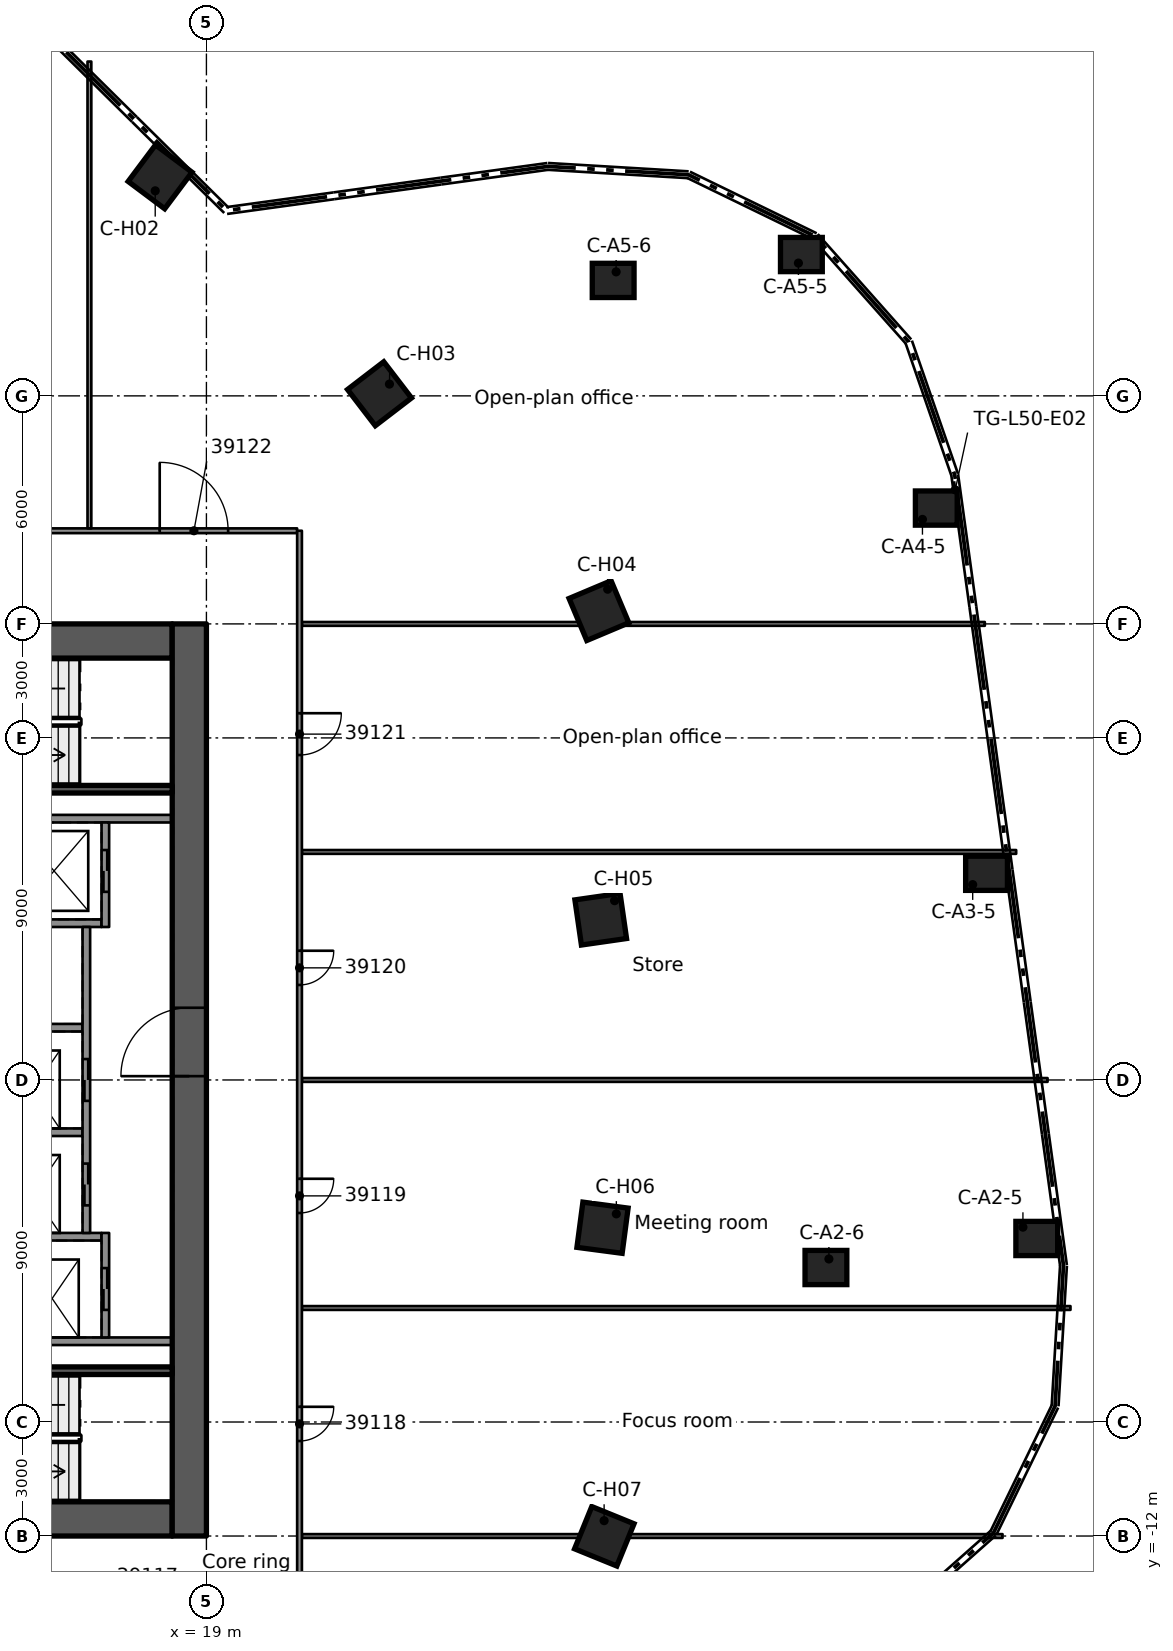
"""IFC4 building model, lengths in metres.
Left out: names, types, materials, properties, quantities, classifications, styles, units other than length and angle.
Written with IfcOpenShell. Run it as: python <this file> out.ifc"""

import sys

from ifc_helpers import new_model, si_unit, direction, frame, frame_2d, origin, origin_2d, place, context, subcontext, project, spatial, rectangle, extrude, element, fill, save


model = new_model("IFC4")
c1 = context("Model", 3, precision=1e-05, world=origin(), true_north=direction((0.0, 1.0)))
c2 = subcontext(c1, "Body", "Model", "MODEL_VIEW")
j1 = project(units=[si_unit("LENGTHUNIT", "METRE"), si_unit("PLANEANGLEUNIT", "RADIAN")], contexts=[c1])
p1 = place(None, origin())
s1 = spatial("IfcSite", under=j1, at=p1, CompositionType="ELEMENT")
p2 = place(p1, origin())
s2 = spatial("IfcBuilding", under=s1, at=p2, CompositionType="ELEMENT")
p3 = place(p2, frame((0.0, 0.0, 192.1)))
s3 = spatial("IfcBuildingStorey", under=s2, at=p3, CompositionType="ELEMENT", Elevation=192.1)
p4 = place(p3, frame((8.9, 11.55, 0.0), z_axis=(0.0, 0.0, 1.0), x_axis=(1.0, 0.0, 0.0)))
e1 = element("IfcWall", 1, at=p4, inside=s3, PredefinedType="SHEAR", context=c2, shape_type="SweptSolid", body=[
    extrude(rectangle(XDim=9.2, YDim=0.9, at=frame_2d((4.6, 0.0))), origin(), (0.0, 0.0, 1.0), 3.5),
])
p5 = place(p4, frame((3.0, 0.0, 0.0)))
e2 = element("IfcOpeningElement", 2, at=p5, cuts=e1, PredefinedType="OPENING", context=c2, shape_type="SweptSolid", body=[
    extrude(rectangle(XDim=1.1, YDim=2.1, at=frame_2d((0.55, 1.05))), frame((0.0, 0.46, 0.0), z_axis=(0.0, -1.0, 0.0), x_axis=(1.0, 0.0, 0.0)), (0.0, 0.0, 1.0), 0.92),
])
p6 = place(p4, frame((0.77, 0.0, 0.0)))
e3 = element("IfcOpeningElement", 3, at=p6, cuts=e1, PredefinedType="OPENING", context=c2, shape_type="SweptSolid", body=[
    extrude(rectangle(XDim=0.9, YDim=2.1, at=frame_2d((0.45, 1.05))), frame((0.0, 0.46, 0.0), z_axis=(0.0, -1.0, 0.0), x_axis=(1.0, 0.0, 0.0)), (0.0, 0.0, 1.0), 0.92),
])
p7 = place(p3, frame((8.9, -11.55, 0.0), z_axis=(0.0, 0.0, 1.0), x_axis=(1.0, 0.0, 0.0)))
e4 = element("IfcWall", 4, at=p7, inside=s3, PredefinedType="SHEAR", context=c2, shape_type="SweptSolid", body=[
    extrude(rectangle(XDim=9.2, YDim=0.9, at=frame_2d((4.6, 0.0))), origin(), (0.0, 0.0, 1.0), 3.5),
])
p8 = place(p7, frame((3.0, 0.0, 0.0)))
e5 = element("IfcOpeningElement", 5, at=p8, cuts=e4, PredefinedType="OPENING", context=c2, shape_type="SweptSolid", body=[
    extrude(rectangle(XDim=1.1, YDim=2.1, at=frame_2d((0.55, 1.05))), frame((0.0, 0.46, 0.0), z_axis=(0.0, -1.0, 0.0), x_axis=(1.0, 0.0, 0.0)), (0.0, 0.0, 1.0), 0.92),
])
p9 = place(p3, frame((18.55, -12.0, 0.0), z_axis=(0.0, 0.0, 1.0), x_axis=(0.0, 1.0, 0.0)))
e6 = element("IfcWall", 6, at=p9, inside=s3, PredefinedType="SHEAR", context=c2, shape_type="SweptSolid", body=[
    extrude(rectangle(XDim=24.0, YDim=0.9, at=frame_2d((12.0, 0.0))), origin(), (0.0, 0.0, 1.0), 3.5),
])
p10 = place(p9, frame((12.1, 0.0, 0.0)))
e7 = element("IfcOpeningElement", 7, at=p10, cuts=e6, PredefinedType="OPENING", context=c2, shape_type="SweptSolid", body=[
    extrude(rectangle(XDim=1.8, YDim=2.1, at=frame_2d((0.9, 1.05))), frame((0.0, 0.46, 0.0), z_axis=(0.0, -1.0, 0.0), x_axis=(1.0, 0.0, 0.0)), (0.0, 0.0, 1.0), 0.92),
])
for number, where, z_axis, x_axis in (
    (8, (40.85, -4.171, 0.0), (0.0, 0.0, 1.0), (1.0, 0.0, 0.0)),
    (9, (35.302, -4.935, 0.0), (0.0, 0.0, 1.0), (1.0, 0.0, 0.0)),
    (10, (39.528, 5.438, 0.0), (0.0, 0.0, 1.0), (1.0, 0.0, 0.0)),
    (11, (38.206, 15.048, 0.0), (0.0, 0.0, 1.0), (1.0, 0.0, 0.0)),
    (12, (34.656, 21.719, 0.0), (0.0, 0.0, 1.0), (1.0, 0.0, 0.0)),
    (13, (29.703, 21.038, 0.0), (0.0, 0.0, 1.0), (1.0, 0.0, 0.0)),
):
    element("IfcColumn", number, at=place(p3, frame(where, z_axis=z_axis, x_axis=x_axis)), inside=s3, PredefinedType="COLUMN", context=c2, shape_type="SweptSolid", body=[
        extrude(rectangle(XDim=1.1, YDim=0.9, at=origin_2d()), origin(), (0.0, 0.0, 1.0), 3.5),
    ])
for number, where, z_axis, x_axis in (
    (14, (17.781, 23.763, 0.0), (0.0, 0.0, 1.0), (0.599, 0.801, 0.0)),
    (15, (23.555, 18.056, 0.0), (0.0, 0.0, 1.0), (0.794, 0.608, 0.0)),
    (16, (29.329, 12.349, 0.0), (0.0, 0.0, 1.0), (0.922, 0.388, 0.0)),
    (17, (29.376, 4.23, 0.0), (0.0, 0.0, 1.0), (0.99, 0.143, 0.0)),
    (18, (29.423, -3.888, 0.0), (0.0, 0.0, 1.0), (0.991, -0.131, 0.0)),
    (19, (29.47, -12.007, 0.0), (0.0, 0.0, 1.0), (0.926, -0.377, 0.0)),
):
    element("IfcColumn", number, at=place(p3, frame(where, z_axis=z_axis, x_axis=x_axis)), inside=s3, PredefinedType="COLUMN", context=c2, shape_type="SweptSolid", body=[
        extrude(rectangle(XDim=1.2, YDim=1.2, at=origin_2d()), origin(), (0.0, 0.0, 1.0), 3.5),
    ])
for number, where, z_axis, x_axis in (
    (20, (11.54, -6.875, 0.0), (0.0, 0.0, 1.0), (1.0, 0.0, 0.0)),
    (21, (11.54, 6.875, 0.0), (0.0, 0.0, 1.0), (1.0, 0.0, 0.0)),
):
    element("IfcWall", number, at=place(p3, frame(where, z_axis=z_axis, x_axis=x_axis)), inside=s3, PredefinedType="SOLIDWALL", context=c2, shape_type="SweptSolid", body=[
        extrude(rectangle(XDim=6.56, YDim=0.2, at=frame_2d((3.28, 0.0))), origin(), (0.0, 0.0, 1.0), 3.08),
    ])
p11 = place(p3, frame((11.54, 4.125, 0.0), z_axis=(0.0, 0.0, 1.0), x_axis=(1.0, 0.0, 0.0)))
e22 = element("IfcWall", 22, at=p11, inside=s3, PredefinedType="SOLIDWALL", context=c2, shape_type="SweptSolid", body=[
    extrude(rectangle(XDim=4.7, YDim=0.2, at=frame_2d((2.35, 0.0))), origin(), (0.0, 0.0, 1.0), 3.08),
])
p12 = place(p3, frame((13.74, 1.375, 0.0), z_axis=(0.0, 0.0, 1.0), x_axis=(1.0, 0.0, 0.0)))
e23 = element("IfcWall", 23, at=p12, inside=s3, PredefinedType="SOLIDWALL", context=c2, shape_type="SweptSolid", body=[
    extrude(rectangle(XDim=2.0, YDim=0.2, at=frame_2d((1.0, 0.0))), origin(), (0.0, 0.0, 1.0), 3.08),
])
p13 = place(p3, frame((11.54, -1.375, 0.0), z_axis=(0.0, 0.0, 1.0), x_axis=(1.0, 0.0, 0.0)))
e24 = element("IfcWall", 24, at=p13, inside=s3, PredefinedType="SOLIDWALL", context=c2, shape_type="SweptSolid", body=[
    extrude(rectangle(XDim=4.2, YDim=0.2, at=frame_2d((2.1, 0.0))), origin(), (0.0, 0.0, 1.0), 3.08),
])
p14 = place(p3, frame((11.54, -4.125, 0.0), z_axis=(0.0, 0.0, 1.0), x_axis=(1.0, 0.0, 0.0)))
e25 = element("IfcWall", 25, at=p14, inside=s3, PredefinedType="SOLIDWALL", context=c2, shape_type="SweptSolid", body=[
    extrude(rectangle(XDim=4.7, YDim=0.2, at=frame_2d((2.35, 0.0))), origin(), (0.0, 0.0, 1.0), 3.08),
])
p15 = place(p3, frame((16.34, 6.775, 0.0), z_axis=(0.0, 0.0, 1.0), x_axis=(0.0, -1.0, 0.0)))
e26 = element("IfcWall", 26, at=p15, inside=s3, PredefinedType="SOLIDWALL", context=c2, shape_type="SweptSolid", body=[
    extrude(rectangle(XDim=2.75, YDim=0.2, at=frame_2d((1.375, 0.0))), origin(), (0.0, 0.0, 1.0), 3.08),
])
p16 = place(p15, frame((0.725, 0.0, 0.0)))
e27 = element("IfcOpeningElement", 27, at=p16, cuts=e26, PredefinedType="OPENING", context=c2, shape_type="SweptSolid", body=[
    extrude(rectangle(XDim=1.1, YDim=2.1, at=frame_2d((0.55, 1.05))), frame((0.0, 0.11, 0.0), z_axis=(0.0, -1.0, 0.0), x_axis=(1.0, 0.0, 0.0)), (0.0, 0.0, 1.0), 0.22),
])
p17 = place(p3, frame((15.84, 4.025, 0.0), z_axis=(0.0, 0.0, 1.0), x_axis=(0.0, -1.0, 0.0)))
e28 = element("IfcWall", 28, at=p17, inside=s3, PredefinedType="SOLIDWALL", context=c2, shape_type="SweptSolid", body=[
    extrude(rectangle(XDim=8.05, YDim=0.2, at=frame_2d((4.025, 0.0))), origin(), (0.0, 0.0, 1.0), 3.08),
])
p18 = place(p17, frame((3.475, 0.0, 0.0)))
e29 = element("IfcOpeningElement", 29, at=p18, cuts=e28, PredefinedType="OPENING", context=c2, shape_type="SweptSolid", body=[
    extrude(rectangle(XDim=1.1, YDim=2.1, at=frame_2d((0.55, 1.05))), frame((0.0, 0.11, 0.0), z_axis=(0.0, -1.0, 0.0), x_axis=(1.0, 0.0, 0.0)), (0.0, 0.0, 1.0), 0.22),
])
p19 = place(p17, frame((6.225, 0.0, 0.0)))
e30 = element("IfcOpeningElement", 30, at=p19, cuts=e28, PredefinedType="OPENING", context=c2, shape_type="SweptSolid", body=[
    extrude(rectangle(XDim=1.1, YDim=2.1, at=frame_2d((0.55, 1.05))), frame((0.0, 0.11, 0.0), z_axis=(0.0, -1.0, 0.0), x_axis=(1.0, 0.0, 0.0)), (0.0, 0.0, 1.0), 0.22),
])
p20 = place(p3, frame((16.34, -4.025, 0.0), z_axis=(0.0, 0.0, 1.0), x_axis=(0.0, -1.0, 0.0)))
e31 = element("IfcWall", 31, at=p20, inside=s3, PredefinedType="SOLIDWALL", context=c2, shape_type="SweptSolid", body=[
    extrude(rectangle(XDim=2.75, YDim=0.2, at=frame_2d((1.375, 0.0))), origin(), (0.0, 0.0, 1.0), 3.08),
])
p21 = place(p20, frame((0.925, 0.0, 0.0)))
e32 = element("IfcOpeningElement", 32, at=p21, cuts=e31, PredefinedType="OPENING", context=c2, shape_type="SweptSolid", body=[
    extrude(rectangle(XDim=1.1, YDim=2.1, at=frame_2d((0.55, 1.05))), frame((0.0, 0.11, 0.0), z_axis=(0.0, -1.0, 0.0), x_axis=(1.0, 0.0, 0.0)), (0.0, 0.0, 1.0), 0.22),
])
for number, where, z_axis, x_axis in (
    (33, (11.54, -7.65, 0.0), (0.0, 0.0, 1.0), (1.0, 0.0, 0.0)),
    (34, (11.54, 7.65, 0.0), (0.0, 0.0, 1.0), (1.0, 0.0, 0.0)),
):
    element("IfcWall", number, at=place(p3, frame(where, z_axis=z_axis, x_axis=x_axis)), inside=s3, PredefinedType="SOLIDWALL", context=c2, shape_type="SweptSolid", body=[
        extrude(rectangle(XDim=6.56, YDim=0.2, at=frame_2d((3.28, 0.0))), origin(), (0.0, 0.0, 1.0), 3.08),
    ])
p22 = place(p3, frame((21.512, -12.0, 0.0), z_axis=(0.0, 0.0, 1.0), x_axis=(1.0, 0.0, 0.0)))
e35 = element("IfcWall", 35, at=p22, inside=s3, PredefinedType="PARTITIONING", context=c2, shape_type="SweptSolid", body=[
    extrude(rectangle(XDim=18.437, YDim=0.1, at=frame_2d((9.219, 0.0))), origin(), (0.0, 0.0, 1.0), 3.06),
])
p23 = place(p3, frame((21.512, -6.0, 0.0), z_axis=(0.0, 0.0, 1.0), x_axis=(1.0, 0.0, 0.0)))
e36 = element("IfcWall", 36, at=p23, inside=s3, PredefinedType="PARTITIONING", context=c2, shape_type="SweptSolid", body=[
    extrude(rectangle(XDim=20.225, YDim=0.1, at=frame_2d((10.113, 0.0))), origin(), (0.0, 0.0, 1.0), 3.06),
])
p24 = place(p3, frame((21.512, 0.0, 0.0), z_axis=(0.0, 0.0, 1.0), x_axis=(1.0, 0.0, 0.0)))
e37 = element("IfcWall", 37, at=p24, inside=s3, PredefinedType="PARTITIONING", context=c2, shape_type="SweptSolid", body=[
    extrude(rectangle(XDim=19.622, YDim=0.1, at=frame_2d((9.811, 0.0))), origin(), (0.0, 0.0, 1.0), 3.06),
])
p25 = place(p3, frame((21.512, 6.0, 0.0), z_axis=(0.0, 0.0, 1.0), x_axis=(1.0, 0.0, 0.0)))
e38 = element("IfcWall", 38, at=p25, inside=s3, PredefinedType="PARTITIONING", context=c2, shape_type="SweptSolid", body=[
    extrude(rectangle(XDim=18.796, YDim=0.1, at=frame_2d((9.398, 0.0))), origin(), (0.0, 0.0, 1.0), 3.06),
])
p26 = place(p3, frame((21.512, 12.0, 0.0), z_axis=(0.0, 0.0, 1.0), x_axis=(1.0, 0.0, 0.0)))
e39 = element("IfcWall", 39, at=p26, inside=s3, PredefinedType="PARTITIONING", context=c2, shape_type="SweptSolid", body=[
    extrude(rectangle(XDim=17.971, YDim=0.1, at=frame_2d((8.985, 0.0))), origin(), (0.0, 0.0, 1.0), 3.06),
])
p27 = place(p3, frame((10.391, 14.451, 0.0), z_axis=(0.0, 0.0, 1.0), x_axis=(1.0, 0.0, 0.0)))
e40 = element("IfcWall", 40, at=p27, inside=s3, PredefinedType="PARTITIONING", context=c2, shape_type="SweptSolid", body=[
    extrude(rectangle(XDim=10.996, YDim=0.125, at=frame_2d((5.498, 0.0))), origin(), (0.0, 0.0, 1.0), 3.06),
])
p28 = place(p27, frame((7.38, 0.0, 0.0)))
e41 = element("IfcOpeningElement", 41, at=p28, cuts=e40, PredefinedType="OPENING", context=c2, shape_type="SweptSolid", body=[
    extrude(rectangle(XDim=1.8, YDim=2.1, at=frame_2d((0.9, 1.05))), frame((0.0, 0.073, 0.0), z_axis=(0.0, -1.0, 0.0), x_axis=(1.0, 0.0, 0.0)), (0.0, 0.0, 1.0), 0.145),
])
p29 = place(p3, frame((21.45, 14.451, 0.0), z_axis=(0.0, 0.0, 1.0), x_axis=(0.0, -1.0, 0.0)))
e42 = element("IfcWall", 42, at=p29, inside=s3, PredefinedType="PARTITIONING", context=c2, shape_type="SweptSolid", body=[
    extrude(rectangle(XDim=28.902, YDim=0.125, at=frame_2d((14.451, 0.0))), origin(), (0.0, 0.0, 1.0), 3.06),
])
p30 = place(p29, frame((23.051, 0.0, 0.0)))
e43 = element("IfcOpeningElement", 43, at=p30, cuts=e42, PredefinedType="OPENING", context=c2, shape_type="SweptSolid", body=[
    extrude(rectangle(XDim=0.9, YDim=2.1, at=frame_2d((0.45, 1.05))), frame((0.0, 0.073, 0.0), z_axis=(0.0, -1.0, 0.0), x_axis=(1.0, 0.0, 0.0)), (0.0, 0.0, 1.0), 0.145),
])
p31 = place(p29, frame((17.051, 0.0, 0.0)))
e44 = element("IfcOpeningElement", 44, at=p31, cuts=e42, PredefinedType="OPENING", context=c2, shape_type="SweptSolid", body=[
    extrude(rectangle(XDim=0.9, YDim=2.1, at=frame_2d((0.45, 1.05))), frame((0.0, 0.073, 0.0), z_axis=(0.0, -1.0, 0.0), x_axis=(1.0, 0.0, 0.0)), (0.0, 0.0, 1.0), 0.145),
])
p32 = place(p29, frame((11.051, 0.0, 0.0)))
e45 = element("IfcOpeningElement", 45, at=p32, cuts=e42, PredefinedType="OPENING", context=c2, shape_type="SweptSolid", body=[
    extrude(rectangle(XDim=0.9, YDim=2.1, at=frame_2d((0.45, 1.05))), frame((0.0, 0.073, 0.0), z_axis=(0.0, -1.0, 0.0), x_axis=(1.0, 0.0, 0.0)), (0.0, 0.0, 1.0), 0.145),
])
p33 = place(p29, frame((4.801, 0.0, 0.0)))
e46 = element("IfcOpeningElement", 46, at=p33, cuts=e42, PredefinedType="OPENING", context=c2, shape_type="SweptSolid", body=[
    extrude(rectangle(XDim=1.1, YDim=2.1, at=frame_2d((0.55, 1.05))), frame((0.0, 0.073, 0.0), z_axis=(0.0, -1.0, 0.0), x_axis=(1.0, 0.0, 0.0)), (0.0, 0.0, 1.0), 0.145),
])
p34 = place(p3, frame((15.921, 14.514, 0.0), z_axis=(0.0, 0.0, 1.0), x_axis=(0.0, 1.0, 0.0)))
e47 = element("IfcWall", 47, at=p34, inside=s3, PredefinedType="PARTITIONING", context=c2, shape_type="SweptSolid", body=[
    extrude(rectangle(XDim=12.283, YDim=0.1, at=frame_2d((6.142, 0.0))), origin(), (0.0, 0.0, 1.0), 3.06),
])
p35 = place(p16, origin())
e48 = element("IfcDoor", 48, at=p35, inside=s3, OperationType="DOUBLE_DOOR_SLIDING", PredefinedType="DOOR", context=c2, shape_type="SweptSolid", body=[
    extrude(rectangle(XDim=1.1, YDim=2.1, at=frame_2d((0.55, 1.05))), frame((0.0, 0.025, 0.0), z_axis=(0.0, -1.0, 0.0), x_axis=(1.0, 0.0, 0.0)), (0.0, 0.0, 1.0), 0.05),
])
fill(e27, e48)
p36 = place(p18, origin())
e49 = element("IfcDoor", 49, at=p36, inside=s3, OperationType="DOUBLE_DOOR_SLIDING", PredefinedType="DOOR", context=c2, shape_type="SweptSolid", body=[
    extrude(rectangle(XDim=1.1, YDim=2.1, at=frame_2d((0.55, 1.05))), frame((0.0, 0.025, 0.0), z_axis=(0.0, -1.0, 0.0), x_axis=(1.0, 0.0, 0.0)), (0.0, 0.0, 1.0), 0.05),
])
fill(e29, e49)
p37 = place(p19, origin())
e50 = element("IfcDoor", 50, at=p37, inside=s3, OperationType="DOUBLE_DOOR_SLIDING", PredefinedType="DOOR", context=c2, shape_type="SweptSolid", body=[
    extrude(rectangle(XDim=1.1, YDim=2.1, at=frame_2d((0.55, 1.05))), frame((0.0, 0.025, 0.0), z_axis=(0.0, -1.0, 0.0), x_axis=(1.0, 0.0, 0.0)), (0.0, 0.0, 1.0), 0.05),
])
fill(e30, e50)
p38 = place(p21, origin())
e51 = element("IfcDoor", 51, at=p38, inside=s3, OperationType="DOUBLE_DOOR_SLIDING", PredefinedType="DOOR", context=c2, shape_type="SweptSolid", body=[
    extrude(rectangle(XDim=1.1, YDim=2.1, at=frame_2d((0.55, 1.05))), frame((0.0, 0.025, 0.0), z_axis=(0.0, -1.0, 0.0), x_axis=(1.0, 0.0, 0.0)), (0.0, 0.0, 1.0), 0.05),
])
fill(e32, e51)
p39 = place(p10, origin())
e52 = element("IfcDoor", 52, at=p39, inside=s3, OperationType="SINGLE_SWING_RIGHT", PredefinedType="DOOR", context=c2, shape_type="SweptSolid", body=[
    extrude(rectangle(XDim=1.8, YDim=2.1, at=frame_2d((0.9, 1.05))), frame((0.0, 0.025, 0.0), z_axis=(0.0, -1.0, 0.0), x_axis=(1.0, 0.0, 0.0)), (0.0, 0.0, 1.0), 0.05),
])
fill(e7, e52)
p40 = place(p30, origin())
e53 = element("IfcDoor", 53, at=p40, inside=s3, OperationType="SINGLE_SWING_RIGHT", PredefinedType="DOOR", context=c2, shape_type="SweptSolid", body=[
    extrude(rectangle(XDim=0.9, YDim=2.1, at=frame_2d((0.45, 1.05))), frame((0.0, 0.025, 0.0), z_axis=(0.0, -1.0, 0.0), x_axis=(1.0, 0.0, 0.0)), (0.0, 0.0, 1.0), 0.05),
])
fill(e43, e53)
p41 = place(p31, origin())
e54 = element("IfcDoor", 54, at=p41, inside=s3, OperationType="SINGLE_SWING_RIGHT", PredefinedType="DOOR", context=c2, shape_type="SweptSolid", body=[
    extrude(rectangle(XDim=0.9, YDim=2.1, at=frame_2d((0.45, 1.05))), frame((0.0, 0.025, 0.0), z_axis=(0.0, -1.0, 0.0), x_axis=(1.0, 0.0, 0.0)), (0.0, 0.0, 1.0), 0.05),
])
fill(e44, e54)
p42 = place(p32, origin())
e55 = element("IfcDoor", 55, at=p42, inside=s3, OperationType="SINGLE_SWING_LEFT", PredefinedType="DOOR", context=c2, shape_type="SweptSolid", body=[
    extrude(rectangle(XDim=0.9, YDim=2.1, at=frame_2d((0.45, 1.05))), frame((0.0, 0.025, 0.0), z_axis=(0.0, -1.0, 0.0), x_axis=(1.0, 0.0, 0.0)), (0.0, 0.0, 1.0), 0.05),
])
fill(e45, e55)
p43 = place(p33, origin())
e56 = element("IfcDoor", 56, at=p43, inside=s3, OperationType="SINGLE_SWING_LEFT", PredefinedType="DOOR", context=c2, shape_type="SweptSolid", body=[
    extrude(rectangle(XDim=1.1, YDim=2.1, at=frame_2d((0.55, 1.05))), frame((0.0, 0.025, 0.0), z_axis=(0.0, -1.0, 0.0), x_axis=(1.0, 0.0, 0.0)), (0.0, 0.0, 1.0), 0.05),
])
fill(e46, e56)
p44 = place(p28, origin())
e57 = element("IfcDoor", 57, at=p44, inside=s3, OperationType="DOUBLE_DOOR_SINGLE_SWING", PredefinedType="DOOR", context=c2, shape_type="SweptSolid", body=[
    extrude(rectangle(XDim=1.8, YDim=2.1, at=frame_2d((0.9, 1.05))), frame((0.0, 0.025, 0.0), z_axis=(0.0, -1.0, 0.0), x_axis=(1.0, 0.0, 0.0)), (0.0, 0.0, 1.0), 0.05),
])
fill(e41, e57)
save(model, sys.argv[1])
